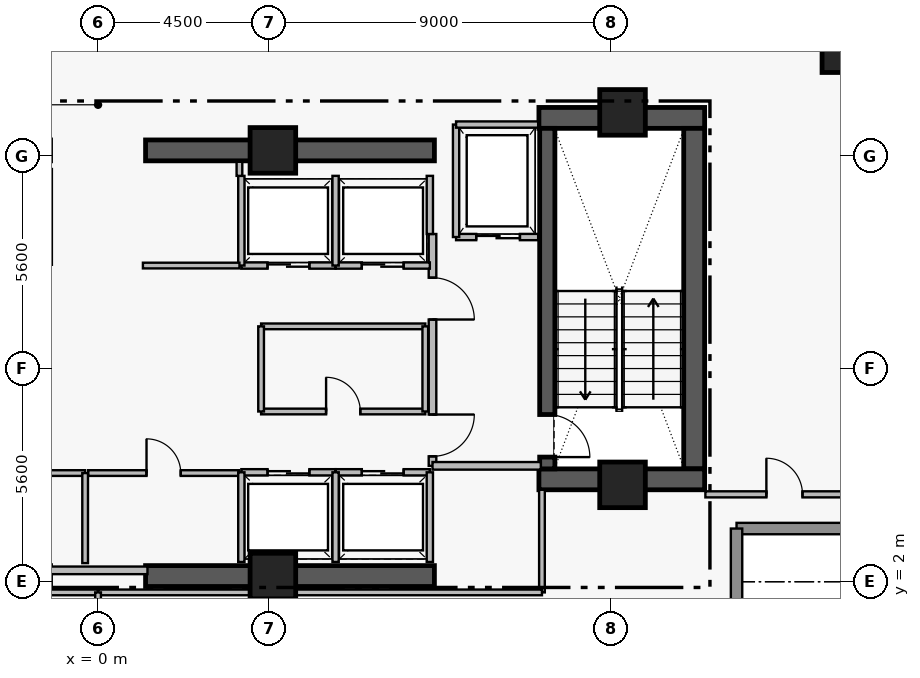
"""IFC4 building model, lengths in metres.
Left out: names, types, materials, properties, quantities, classifications, styles, units other than length and angle.
Written with IfcOpenShell. Run it as: python <this file> out.ifc"""

import sys

from ifc_helpers import new_model, si_unit, direction, frame, frame_2d, origin, origin_2d, place, context, subcontext, project, spatial, rectangle, extrude, element, fill, save


model = new_model("IFC4")
c1 = context("Model", 3, precision=1e-05, world=origin(), true_north=direction((0.0, 1.0)))
c2 = subcontext(c1, "Body", "Model", "MODEL_VIEW")
j1 = project(units=[si_unit("LENGTHUNIT", "METRE"), si_unit("PLANEANGLEUNIT", "RADIAN")], contexts=[c1])
p1 = place(None, origin())
s1 = spatial("IfcSite", under=j1, at=p1, CompositionType="ELEMENT")
p2 = place(p1, origin())
s2 = spatial("IfcBuilding", under=s1, at=p2, CompositionType="ELEMENT")
p3 = place(p2, frame((0.0, 0.0, 272.95)))
s3 = spatial("IfcBuildingStorey", under=s2, at=p3, CompositionType="ELEMENT", Elevation=272.95)
p4 = place(p3, frame((11.6, 14.205, 0.0), z_axis=(0.0, 0.0, 1.0), x_axis=(1.0, 0.0, 0.0)))
e1 = element("IfcWall", 1, at=p4, inside=s3, PredefinedType="SHEAR", context=c2, shape_type="SweptSolid", body=[
    extrude(rectangle(XDim=4.36, YDim=0.55, at=frame_2d((2.18, 0.0))), origin(), (0.0, 0.0, 1.0), 3.51),
])
p5 = place(p3, frame((15.685, 4.97, 0.0), z_axis=(0.0, 0.0, 1.0), x_axis=(0.0, 1.0, 0.0)))
e2 = element("IfcWall", 2, at=p5, inside=s3, PredefinedType="SHEAR", context=c2, shape_type="SweptSolid", body=[
    extrude(rectangle(XDim=8.96, YDim=0.55, at=frame_2d((4.48, 0.0))), origin(), (0.0, 0.0, 1.0), 3.51),
])
p6 = place(p3, frame((11.6, 4.695, 0.0), z_axis=(0.0, 0.0, 1.0), x_axis=(1.0, 0.0, 0.0)))
e3 = element("IfcWall", 3, at=p6, inside=s3, PredefinedType="SHEAR", context=c2, shape_type="SweptSolid", body=[
    extrude(rectangle(XDim=4.36, YDim=0.55, at=frame_2d((2.18, 0.0))), origin(), (0.0, 0.0, 1.0), 3.51),
])
for number, where, z_axis, x_axis in (
    (4, (1.25, 2.15, 0.0), (0.0, 0.0, 1.0), (1.0, 0.0, 0.0)),
    (5, (1.25, 13.35, 0.0), (0.0, 0.0, 1.0), (1.0, 0.0, 0.0)),
):
    element("IfcWall", number, at=place(p3, frame(where, z_axis=z_axis, x_axis=x_axis)), inside=s3, PredefinedType="SHEAR", context=c2, shape_type="SweptSolid", body=[
        extrude(rectangle(XDim=7.6, YDim=0.55, at=frame_2d((3.8, 0.0))), origin(), (0.0, 0.0, 1.0), 3.48),
    ])
p7 = place(p3, frame((11.82, 13.93, 0.0), z_axis=(0.0, 0.0, 1.0), x_axis=(0.0, -1.0, 0.0)))
e6 = element("IfcWall", 6, at=p7, inside=s3, PredefinedType="SHEAR", context=c2, shape_type="SweptSolid", body=[
    extrude(rectangle(XDim=8.96, YDim=0.4, at=frame_2d((4.48, 0.0))), origin(), (0.0, 0.0, 1.0), 3.51),
])
p8 = place(p7, frame((7.53, 0.0, 0.0)))
e7 = element("IfcOpeningElement", 7, at=p8, cuts=e6, PredefinedType="OPENING", context=c2, shape_type="SweptSolid", body=[
    extrude(rectangle(XDim=1.12, YDim=2.22, at=frame_2d((0.56, 1.11))), frame((0.0, 0.21, 0.0), z_axis=(0.0, -1.0, 0.0), x_axis=(1.0, 0.0, 0.0)), (0.0, 0.0, 1.0), 0.42),
])
for number, where, z_axis, x_axis in (
    (8, (4.6, 13.35, 0.0), (0.0, 0.0, 1.0), (1.0, 0.0, 0.0)),
    (9, (13.8, 14.35, 0.0), (0.0, 0.0, 1.0), (1.0, 0.0, 0.0)),
    (10, (4.6, 2.15, 0.0), (0.0, 0.0, 1.0), (1.0, 0.0, 0.0)),
    (11, (13.8, 4.55, 0.0), (0.0, 0.0, 1.0), (1.0, 0.0, 0.0)),
):
    element("IfcColumn", number, at=place(p3, frame(where, z_axis=z_axis, x_axis=x_axis)), inside=s3, PredefinedType="COLUMN", context=c2, shape_type="SweptSolid", body=[
        extrude(rectangle(XDim=1.2, YDim=1.2, at=origin_2d()), origin(), (0.0, 0.0, 1.0), 3.7),
    ])
p9 = place(p3, frame((19.55, 15.9, 0.0), z_axis=(0.0, 0.0, 1.0), x_axis=(1.0, 0.0, 0.0)))
e12 = element("IfcColumn", 12, at=p9, inside=s3, PredefinedType="COLUMN", context=c2, shape_type="SweptSolid", body=[
    extrude(rectangle(XDim=1.0, YDim=1.0, at=origin_2d()), origin(), (0.0, 0.0, 1.0), 3.7),
])
for number, where, z_axis, x_axis in (
    (13, (20.2, 3.4, 0.0), (0.0, 0.0, 1.0), (-1.0, 0.0, 0.0)),
    (14, (16.8, 3.4, 0.0), (0.0, 0.0, 1.0), (0.0, -1.0, 0.0)),
):
    element("IfcWall", number, at=place(p3, frame(where, z_axis=z_axis, x_axis=x_axis)), inside=s3, PredefinedType="STANDARD", context=c2, shape_type="SweptSolid", body=[
        extrude(rectangle(XDim=3.4, YDim=0.3, at=frame_2d((1.7, 0.0))), origin(), (0.0, 0.0, 1.0), 3.48),
    ])
p10 = place(p3, frame((8.8, 11.15, 0.0), z_axis=(0.0, 0.0, 1.0), x_axis=(0.0, -1.0, 0.0)))
e15 = element("IfcWall", 15, at=p10, inside=s3, PredefinedType="PARTITIONING", context=c2, shape_type="SweptSolid", body=[
    extrude(rectangle(XDim=6.1, YDim=0.2, at=frame_2d((3.05, 0.0))), origin(), (0.0, 0.0, 1.0), 3.48),
])
p11 = place(p10, frame((1.15, 0.0, 0.0)))
e16 = element("IfcOpeningElement", 16, at=p11, cuts=e15, PredefinedType="OPENING", context=c2, shape_type="SweptSolid", body=[
    extrude(rectangle(XDim=1.1, YDim=2.2, at=frame_2d((0.55, 1.1))), frame((0.0, 0.11, 0.0), z_axis=(0.0, -1.0, 0.0), x_axis=(1.0, 0.0, 0.0)), (0.0, 0.0, 1.0), 0.22),
])
p12 = place(p10, frame((4.75, 0.0, 0.0)))
e17 = element("IfcOpeningElement", 17, at=p12, cuts=e15, PredefinedType="OPENING", context=c2, shape_type="SweptSolid", body=[
    extrude(rectangle(XDim=1.1, YDim=2.2, at=frame_2d((0.55, 1.1))), frame((0.0, 0.11, 0.0), z_axis=(0.0, -1.0, 0.0), x_axis=(1.0, 0.0, 0.0)), (0.0, 0.0, 1.0), 0.22),
])
p13 = place(p3, frame((9.42, 11.07, 0.0), z_axis=(0.0, 0.0, 1.0), x_axis=(1.0, 0.0, 0.0)))
e18 = element("IfcWall", 18, at=p13, inside=s3, PredefinedType="PARTITIONING", context=c2, shape_type="SweptSolid", body=[
    extrude(rectangle(XDim=2.16, YDim=0.165, at=frame_2d((1.08, 0.0))), origin(), (0.0, 0.0, 1.0), 3.48),
])
p14 = place(p13, frame((0.53, 0.0, 0.0)))
e19 = element("IfcOpeningElement", 19, at=p14, cuts=e18, PredefinedType="OPENING", context=c2, shape_type="SweptSolid", body=[
    extrude(rectangle(XDim=1.15, YDim=2.25, at=frame_2d((0.575, 1.125))), frame((0.0, 0.093, 0.0), z_axis=(0.0, -1.0, 0.0), x_axis=(1.0, 0.0, 0.0)), (0.0, 0.0, 1.0), 0.185),
])
p15 = place(p3, frame((3.77, 4.88, 0.0), z_axis=(0.0, 0.0, 1.0), x_axis=(1.0, 0.0, 0.0)))
e20 = element("IfcWall", 20, at=p15, inside=s3, PredefinedType="PARTITIONING", context=c2, shape_type="SweptSolid", body=[
    extrude(rectangle(XDim=2.48, YDim=0.165, at=frame_2d((1.24, 0.0))), origin(), (0.0, 0.0, 1.0), 3.48),
])
p16 = place(p15, frame((0.69, 0.0, 0.0)))
e21 = element("IfcOpeningElement", 21, at=p16, cuts=e20, PredefinedType="OPENING", context=c2, shape_type="SweptSolid", body=[
    extrude(rectangle(XDim=1.1, YDim=2.25, at=frame_2d((0.55, 1.125))), frame((0.0, 0.093, 0.0), z_axis=(0.0, -1.0, 0.0), x_axis=(1.0, 0.0, 0.0)), (0.0, 0.0, 1.0), 0.185),
])
p17 = place(p3, frame((6.25, 4.88, 0.0), z_axis=(0.0, 0.0, 1.0), x_axis=(1.0, 0.0, 0.0)))
e22 = element("IfcWall", 22, at=p17, inside=s3, PredefinedType="PARTITIONING", context=c2, shape_type="SweptSolid", body=[
    extrude(rectangle(XDim=2.48, YDim=0.165, at=frame_2d((1.24, 0.0))), origin(), (0.0, 0.0, 1.0), 3.48),
])
p18 = place(p17, frame((0.69, 0.0, 0.0)))
e23 = element("IfcOpeningElement", 23, at=p18, cuts=e22, PredefinedType="OPENING", context=c2, shape_type="SweptSolid", body=[
    extrude(rectangle(XDim=1.1, YDim=2.25, at=frame_2d((0.55, 1.125))), frame((0.0, 0.093, 0.0), z_axis=(0.0, -1.0, 0.0), x_axis=(1.0, 0.0, 0.0)), (0.0, 0.0, 1.0), 0.185),
])
p19 = place(p3, frame((3.77, 10.32, 0.0), z_axis=(0.0, 0.0, 1.0), x_axis=(1.0, 0.0, 0.0)))
e24 = element("IfcWall", 24, at=p19, inside=s3, PredefinedType="PARTITIONING", context=c2, shape_type="SweptSolid", body=[
    extrude(rectangle(XDim=2.48, YDim=0.165, at=frame_2d((1.24, 0.0))), origin(), (0.0, 0.0, 1.0), 3.48),
])
p20 = place(p19, frame((0.69, 0.0, 0.0)))
e25 = element("IfcOpeningElement", 25, at=p20, cuts=e24, PredefinedType="OPENING", context=c2, shape_type="SweptSolid", body=[
    extrude(rectangle(XDim=1.1, YDim=2.25, at=frame_2d((0.55, 1.125))), frame((0.0, 0.093, 0.0), z_axis=(0.0, -1.0, 0.0), x_axis=(1.0, 0.0, 0.0)), (0.0, 0.0, 1.0), 0.185),
])
p21 = place(p3, frame((6.25, 10.32, 0.0), z_axis=(0.0, 0.0, 1.0), x_axis=(1.0, 0.0, 0.0)))
e26 = element("IfcWall", 26, at=p21, inside=s3, PredefinedType="PARTITIONING", context=c2, shape_type="SweptSolid", body=[
    extrude(rectangle(XDim=2.48, YDim=0.165, at=frame_2d((1.24, 0.0))), origin(), (0.0, 0.0, 1.0), 3.48),
])
p22 = place(p21, frame((0.69, 0.0, 0.0)))
e27 = element("IfcOpeningElement", 27, at=p22, cuts=e26, PredefinedType="OPENING", context=c2, shape_type="SweptSolid", body=[
    extrude(rectangle(XDim=1.1, YDim=2.25, at=frame_2d((0.55, 1.125))), frame((0.0, 0.093, 0.0), z_axis=(0.0, -1.0, 0.0), x_axis=(1.0, 0.0, 0.0)), (0.0, 0.0, 1.0), 0.185),
])
p23 = place(p3, frame((-8.71, 4.86, 0.0), z_axis=(0.0, 0.0, 1.0), x_axis=(1.0, 0.0, 0.0)))
e28 = element("IfcWall", 28, at=p23, inside=s3, PredefinedType="PARTITIONING", context=c2, shape_type="SweptSolid", body=[
    extrude(rectangle(XDim=8.37, YDim=0.15, at=frame_2d((4.185, 0.0))), origin(), (0.0, 0.0, 1.0), 3.48),
])
p24 = place(p23, frame((3.735, 0.0, 0.0)))
e29 = element("IfcOpeningElement", 29, at=p24, cuts=e28, PredefinedType="OPENING", context=c2, shape_type="SweptSolid", body=[
    extrude(rectangle(XDim=0.9, YDim=2.15, at=frame_2d((0.45, 1.075))), frame((0.0, 0.085, 0.0), z_axis=(0.0, -1.0, 0.0), x_axis=(1.0, 0.0, 0.0)), (0.0, 0.0, 1.0), 0.17),
])
p25 = place(p3, frame((-0.26, 4.86, 0.0), z_axis=(0.0, 0.0, 1.0), x_axis=(1.0, 0.0, 0.0)))
e30 = element("IfcWall", 30, at=p25, inside=s3, PredefinedType="PARTITIONING", context=c2, shape_type="SweptSolid", body=[
    extrude(rectangle(XDim=3.97, YDim=0.15, at=frame_2d((1.985, 0.0))), origin(), (0.0, 0.0, 1.0), 3.48),
])
p26 = place(p25, frame((1.535, 0.0, 0.0)))
e31 = element("IfcOpeningElement", 31, at=p26, cuts=e30, PredefinedType="OPENING", context=c2, shape_type="SweptSolid", body=[
    extrude(rectangle(XDim=0.9, YDim=2.15, at=frame_2d((0.45, 1.075))), frame((0.0, 0.085, 0.0), z_axis=(0.0, -1.0, 0.0), x_axis=(1.0, 0.0, 0.0)), (0.0, 0.0, 1.0), 0.17),
])
p27 = place(p3, frame((4.29, 6.48, 0.0), z_axis=(0.0, 0.0, 1.0), x_axis=(1.0, 0.0, 0.0)))
e32 = element("IfcWall", 32, at=p27, inside=s3, PredefinedType="PARTITIONING", context=c2, shape_type="SweptSolid", body=[
    extrude(rectangle(XDim=4.32, YDim=0.15, at=frame_2d((2.16, 0.0))), origin(), (0.0, 0.0, 1.0), 3.48),
])
p28 = place(p27, frame((1.71, 0.0, 0.0)))
e33 = element("IfcOpeningElement", 33, at=p28, cuts=e32, PredefinedType="OPENING", context=c2, shape_type="SweptSolid", body=[
    extrude(rectangle(XDim=0.9, YDim=2.15, at=frame_2d((0.45, 1.075))), frame((0.0, 0.085, 0.0), z_axis=(0.0, -1.0, 0.0), x_axis=(1.0, 0.0, 0.0)), (0.0, 0.0, 1.0), 0.17),
])
p29 = place(p3, frame((15.98, 4.3, 0.0), z_axis=(0.0, 0.0, 1.0), x_axis=(1.0, 0.0, 0.0)))
e34 = element("IfcWall", 34, at=p29, inside=s3, PredefinedType="PARTITIONING", context=c2, shape_type="SweptSolid", body=[
    extrude(rectangle(XDim=4.16, YDim=0.16, at=frame_2d((2.08, 0.0))), origin(), (0.0, 0.0, 1.0), 3.48),
])
p30 = place(p29, frame((1.605, 0.0, 0.0)))
e35 = element("IfcOpeningElement", 35, at=p30, cuts=e34, PredefinedType="OPENING", context=c2, shape_type="SweptSolid", body=[
    extrude(rectangle(XDim=0.95, YDim=2.15, at=frame_2d((0.475, 1.075))), frame((0.0, 0.09, 0.0), z_axis=(0.0, -1.0, 0.0), x_axis=(1.0, 0.0, 0.0)), (0.0, 0.0, 1.0), 0.18),
])
p31 = place(p3, frame((8.8, 5.05, 0.0), z_axis=(0.0, 0.0, 1.0), x_axis=(1.0, 0.0, 0.0)))
e36 = element("IfcWall", 36, at=p31, inside=s3, PredefinedType="PARTITIONING", context=c2, shape_type="SweptSolid", body=[
    extrude(rectangle(XDim=2.85, YDim=0.2, at=frame_2d((1.425, 0.0))), origin(), (0.0, 0.0, 1.0), 3.48),
])
p32 = place(p3, frame((9.42, 11.07, 0.0), z_axis=(0.0, 0.0, 1.0), x_axis=(0.0, 1.0, 0.0)))
e37 = element("IfcWall", 37, at=p32, inside=s3, PredefinedType="PARTITIONING", context=c2, shape_type="SweptSolid", body=[
    extrude(rectangle(XDim=2.96, YDim=0.165, at=frame_2d((1.48, 0.0))), origin(), (0.0, 0.0, 1.0), 3.48),
])
p33 = place(p3, frame((9.42, 14.03, 0.0), z_axis=(0.0, 0.0, 1.0), x_axis=(1.0, 0.0, 0.0)))
e38 = element("IfcWall", 38, at=p33, inside=s3, PredefinedType="PARTITIONING", context=c2, shape_type="SweptSolid", body=[
    extrude(rectangle(XDim=2.16, YDim=0.165, at=frame_2d((1.08, 0.0))), origin(), (0.0, 0.0, 1.0), 3.48),
])
for number, where, z_axis, x_axis in (
    (39, (3.77, 2.52, 0.0), (0.0, 0.0, 1.0), (0.0, 1.0, 0.0)),
    (40, (6.25, 2.52, 0.0), (0.0, 0.0, 1.0), (0.0, 1.0, 0.0)),
    (41, (8.73, 2.52, 0.0), (0.0, 0.0, 1.0), (0.0, 1.0, 0.0)),
    (42, (3.77, 10.32, 0.0), (0.0, 0.0, 1.0), (0.0, 1.0, 0.0)),
    (43, (6.25, 10.32, 0.0), (0.0, 0.0, 1.0), (0.0, 1.0, 0.0)),
):
    element("IfcWall", number, at=place(p3, frame(where, z_axis=z_axis, x_axis=x_axis)), inside=s3, PredefinedType="PARTITIONING", context=c2, shape_type="SweptSolid", body=[
        extrude(rectangle(XDim=2.36, YDim=0.165, at=frame_2d((1.18, 0.0))), origin(), (0.0, 0.0, 1.0), 3.48),
    ])
p34 = place(p3, frame((8.73, 11.15, 0.0), z_axis=(0.0, 0.0, 1.0), x_axis=(0.0, 1.0, 0.0)))
e44 = element("IfcWall", 44, at=p34, inside=s3, PredefinedType="PARTITIONING", context=c2, shape_type="SweptSolid", body=[
    extrude(rectangle(XDim=1.53, YDim=0.165, at=frame_2d((0.765, 0.0))), origin(), (0.0, 0.0, 1.0), 3.48),
])
p35 = place(p3, frame((-1.3, 2.3, 0.0), z_axis=(0.0, 0.0, 1.0), x_axis=(1.0, 0.0, 0.0)))
e45 = element("IfcWall", 45, at=p35, inside=s3, PredefinedType="PARTITIONING", context=c2, shape_type="SweptSolid", body=[
    extrude(rectangle(XDim=2.6, YDim=0.2, at=frame_2d((1.3, 0.0))), origin(), (0.0, 0.0, 1.0), 2.38),
])
p36 = place(p3, frame((-0.34, 2.49, 0.0), z_axis=(0.0, 0.0, 1.0), x_axis=(0.0, 1.0, 0.0)))
e46 = element("IfcWall", 46, at=p36, inside=s3, PredefinedType="PARTITIONING", context=c2, shape_type="SweptSolid", body=[
    extrude(rectangle(XDim=2.37, YDim=0.15, at=frame_2d((1.185, 0.0))), origin(), (0.0, 0.0, 1.0), 3.48),
])
p37 = place(p3, frame((4.29, 8.72, 0.0), z_axis=(0.0, 0.0, 1.0), x_axis=(1.0, 0.0, 0.0)))
e47 = element("IfcWall", 47, at=p37, inside=s3, PredefinedType="PARTITIONING", context=c2, shape_type="SweptSolid", body=[
    extrude(rectangle(XDim=4.32, YDim=0.15, at=frame_2d((2.16, 0.0))), origin(), (0.0, 0.0, 1.0), 3.48),
])
for number, where, z_axis, x_axis in (
    (48, (4.29, 6.48, 0.0), (0.0, 0.0, 1.0), (0.0, 1.0, 0.0)),
    (49, (8.61, 6.48, 0.0), (0.0, 0.0, 1.0), (0.0, 1.0, 0.0)),
):
    element("IfcWall", number, at=place(p3, frame(where, z_axis=z_axis, x_axis=x_axis)), inside=s3, PredefinedType="PARTITIONING", context=c2, shape_type="SweptSolid", body=[
        extrude(rectangle(XDim=2.24, YDim=0.15, at=frame_2d((1.12, 0.0))), origin(), (0.0, 0.0, 1.0), 3.48),
    ])
p38 = place(p3, frame((1.18, 10.32, 0.0), z_axis=(0.0, 0.0, 1.0), x_axis=(1.0, 0.0, 0.0)))
e50 = element("IfcWall", 50, at=p38, inside=s3, PredefinedType="PARTITIONING", context=c2, shape_type="SweptSolid", body=[
    extrude(rectangle(XDim=2.54, YDim=0.15, at=frame_2d((1.27, 0.0))), origin(), (0.0, 0.0, 1.0), 3.48),
])
p39 = place(p3, frame((3.72, 12.68, 0.0), z_axis=(0.0, 0.0, 1.0), x_axis=(0.0, 1.0, 0.0)))
e51 = element("IfcWall", 51, at=p39, inside=s3, PredefinedType="PARTITIONING", context=c2, shape_type="SweptSolid", body=[
    extrude(rectangle(XDim=0.37, YDim=0.15, at=frame_2d((0.185, 0.0))), origin(), (0.0, 0.0, 1.0), 3.48),
])
p40 = place(p3, frame((-11.68, 1.72, 0.0), z_axis=(0.0, 0.0, 1.0), x_axis=(1.0, 0.0, 0.0)))
e52 = element("IfcWall", 52, at=p40, inside=s3, PredefinedType="PARTITIONING", context=c2, shape_type="SweptSolid", body=[
    extrude(rectangle(XDim=11.68, YDim=0.15, at=frame_2d((5.84, 0.0))), origin(), (0.0, 0.0, 1.0), 2.38),
])
p41 = place(p3, frame((11.68, 1.72, 0.0), z_axis=(0.0, 0.0, 1.0), x_axis=(0.0, 1.0, 0.0)))
e53 = element("IfcWall", 53, at=p41, inside=s3, PredefinedType="PARTITIONING", context=c2, shape_type="SweptSolid", body=[
    extrude(rectangle(XDim=2.7, YDim=0.15, at=frame_2d((1.35, 0.0))), origin(), (0.0, 0.0, 1.0), 3.48),
])
p42 = place(p3, frame((0.0, 1.72, 0.0), z_axis=(0.0, 0.0, 1.0), x_axis=(1.0, 0.0, 0.0)))
e54 = element("IfcWall", 54, at=p42, inside=s3, PredefinedType="PARTITIONING", context=c2, shape_type="SweptSolid", body=[
    extrude(rectangle(XDim=11.68, YDim=0.15, at=frame_2d((5.84, 0.0))), origin(), (0.0, 0.0, 1.0), 2.38),
])
p43 = place(p3, frame((0.0, 0.06, 0.0), z_axis=(0.0, 0.0, 1.0), x_axis=(0.0, 1.0, 0.0)))
e55 = element("IfcWall", 55, at=p43, inside=s3, PredefinedType="PARTITIONING", context=c2, shape_type="SweptSolid", body=[
    extrude(rectangle(XDim=1.66, YDim=0.15, at=frame_2d((0.83, 0.0))), origin(), (0.0, 0.0, 1.0), 3.48),
])
p44 = place(p8, origin())
e56 = element("IfcDoor", 56, at=p44, inside=s3, OperationType="SINGLE_SWING_RIGHT", PredefinedType="DOOR", context=c2, shape_type="SweptSolid", body=[
    extrude(rectangle(XDim=1.12, YDim=2.22, at=frame_2d((0.56, 1.11))), frame((0.0, 0.025, 0.0), z_axis=(0.0, -1.0, 0.0), x_axis=(1.0, 0.0, 0.0)), (0.0, 0.0, 1.0), 0.05),
])
fill(e7, e56)
p45 = place(p11, origin())
e57 = element("IfcDoor", 57, at=p45, inside=s3, OperationType="SINGLE_SWING_RIGHT", PredefinedType="DOOR", context=c2, shape_type="SweptSolid", body=[
    extrude(rectangle(XDim=1.1, YDim=2.2, at=frame_2d((0.55, 1.1))), frame((0.0, 0.025, 0.0), z_axis=(0.0, -1.0, 0.0), x_axis=(1.0, 0.0, 0.0)), (0.0, 0.0, 1.0), 0.05),
])
fill(e16, e57)
p46 = place(p12, origin())
e58 = element("IfcDoor", 58, at=p46, inside=s3, OperationType="SINGLE_SWING_LEFT", PredefinedType="DOOR", context=c2, shape_type="SweptSolid", body=[
    extrude(rectangle(XDim=1.1, YDim=2.2, at=frame_2d((0.55, 1.1))), frame((0.0, 0.025, 0.0), z_axis=(0.0, -1.0, 0.0), x_axis=(1.0, 0.0, 0.0)), (0.0, 0.0, 1.0), 0.05),
])
fill(e17, e58)
p47 = place(p14, origin())
e59 = element("IfcDoor", 59, at=p47, inside=s3, OperationType="SLIDING_TO_LEFT", PredefinedType="DOOR", context=c2, shape_type="SweptSolid", body=[
    extrude(rectangle(XDim=1.15, YDim=2.25, at=frame_2d((0.575, 1.125))), frame((0.0, 0.025, 0.0), z_axis=(0.0, -1.0, 0.0), x_axis=(1.0, 0.0, 0.0)), (0.0, 0.0, 1.0), 0.05),
])
fill(e19, e59)
p48 = place(p16, origin())
e60 = element("IfcDoor", 60, at=p48, inside=s3, OperationType="SLIDING_TO_LEFT", PredefinedType="DOOR", context=c2, shape_type="SweptSolid", body=[
    extrude(rectangle(XDim=1.1, YDim=2.25, at=frame_2d((0.55, 1.125))), frame((0.0, 0.025, 0.0), z_axis=(0.0, -1.0, 0.0), x_axis=(1.0, 0.0, 0.0)), (0.0, 0.0, 1.0), 0.05),
])
fill(e21, e60)
p49 = place(p18, origin())
e61 = element("IfcDoor", 61, at=p49, inside=s3, OperationType="SLIDING_TO_LEFT", PredefinedType="DOOR", context=c2, shape_type="SweptSolid", body=[
    extrude(rectangle(XDim=1.1, YDim=2.25, at=frame_2d((0.55, 1.125))), frame((0.0, 0.025, 0.0), z_axis=(0.0, -1.0, 0.0), x_axis=(1.0, 0.0, 0.0)), (0.0, 0.0, 1.0), 0.05),
])
fill(e23, e61)
p50 = place(p20, origin())
e62 = element("IfcDoor", 62, at=p50, inside=s3, OperationType="SLIDING_TO_LEFT", PredefinedType="DOOR", context=c2, shape_type="SweptSolid", body=[
    extrude(rectangle(XDim=1.1, YDim=2.25, at=frame_2d((0.55, 1.125))), frame((0.0, 0.025, 0.0), z_axis=(0.0, -1.0, 0.0), x_axis=(1.0, 0.0, 0.0)), (0.0, 0.0, 1.0), 0.05),
])
fill(e25, e62)
p51 = place(p22, origin())
e63 = element("IfcDoor", 63, at=p51, inside=s3, OperationType="SLIDING_TO_LEFT", PredefinedType="DOOR", context=c2, shape_type="SweptSolid", body=[
    extrude(rectangle(XDim=1.1, YDim=2.25, at=frame_2d((0.55, 1.125))), frame((0.0, 0.025, 0.0), z_axis=(0.0, -1.0, 0.0), x_axis=(1.0, 0.0, 0.0)), (0.0, 0.0, 1.0), 0.05),
])
fill(e27, e63)
p52 = place(p26, origin())
e64 = element("IfcDoor", 64, at=p52, inside=s3, OperationType="SINGLE_SWING_LEFT", PredefinedType="DOOR", context=c2, shape_type="SweptSolid", body=[
    extrude(rectangle(XDim=0.9, YDim=2.15, at=frame_2d((0.45, 1.075))), frame((0.0, 0.025, 0.0), z_axis=(0.0, -1.0, 0.0), x_axis=(1.0, 0.0, 0.0)), (0.0, 0.0, 1.0), 0.05),
])
fill(e31, e64)
p53 = place(p28, origin())
e65 = element("IfcDoor", 65, at=p53, inside=s3, OperationType="SINGLE_SWING_LEFT", PredefinedType="DOOR", context=c2, shape_type="SweptSolid", body=[
    extrude(rectangle(XDim=0.9, YDim=2.15, at=frame_2d((0.45, 1.075))), frame((0.0, 0.025, 0.0), z_axis=(0.0, -1.0, 0.0), x_axis=(1.0, 0.0, 0.0)), (0.0, 0.0, 1.0), 0.05),
])
fill(e33, e65)
p54 = place(p30, origin())
e66 = element("IfcDoor", 66, at=p54, inside=s3, OperationType="SINGLE_SWING_LEFT", PredefinedType="DOOR", context=c2, shape_type="SweptSolid", body=[
    extrude(rectangle(XDim=0.95, YDim=2.15, at=frame_2d((0.475, 1.075))), frame((0.0, 0.025, 0.0), z_axis=(0.0, -1.0, 0.0), x_axis=(1.0, 0.0, 0.0)), (0.0, 0.0, 1.0), 0.05),
])
fill(e35, e66)
save(model, sys.argv[1])
